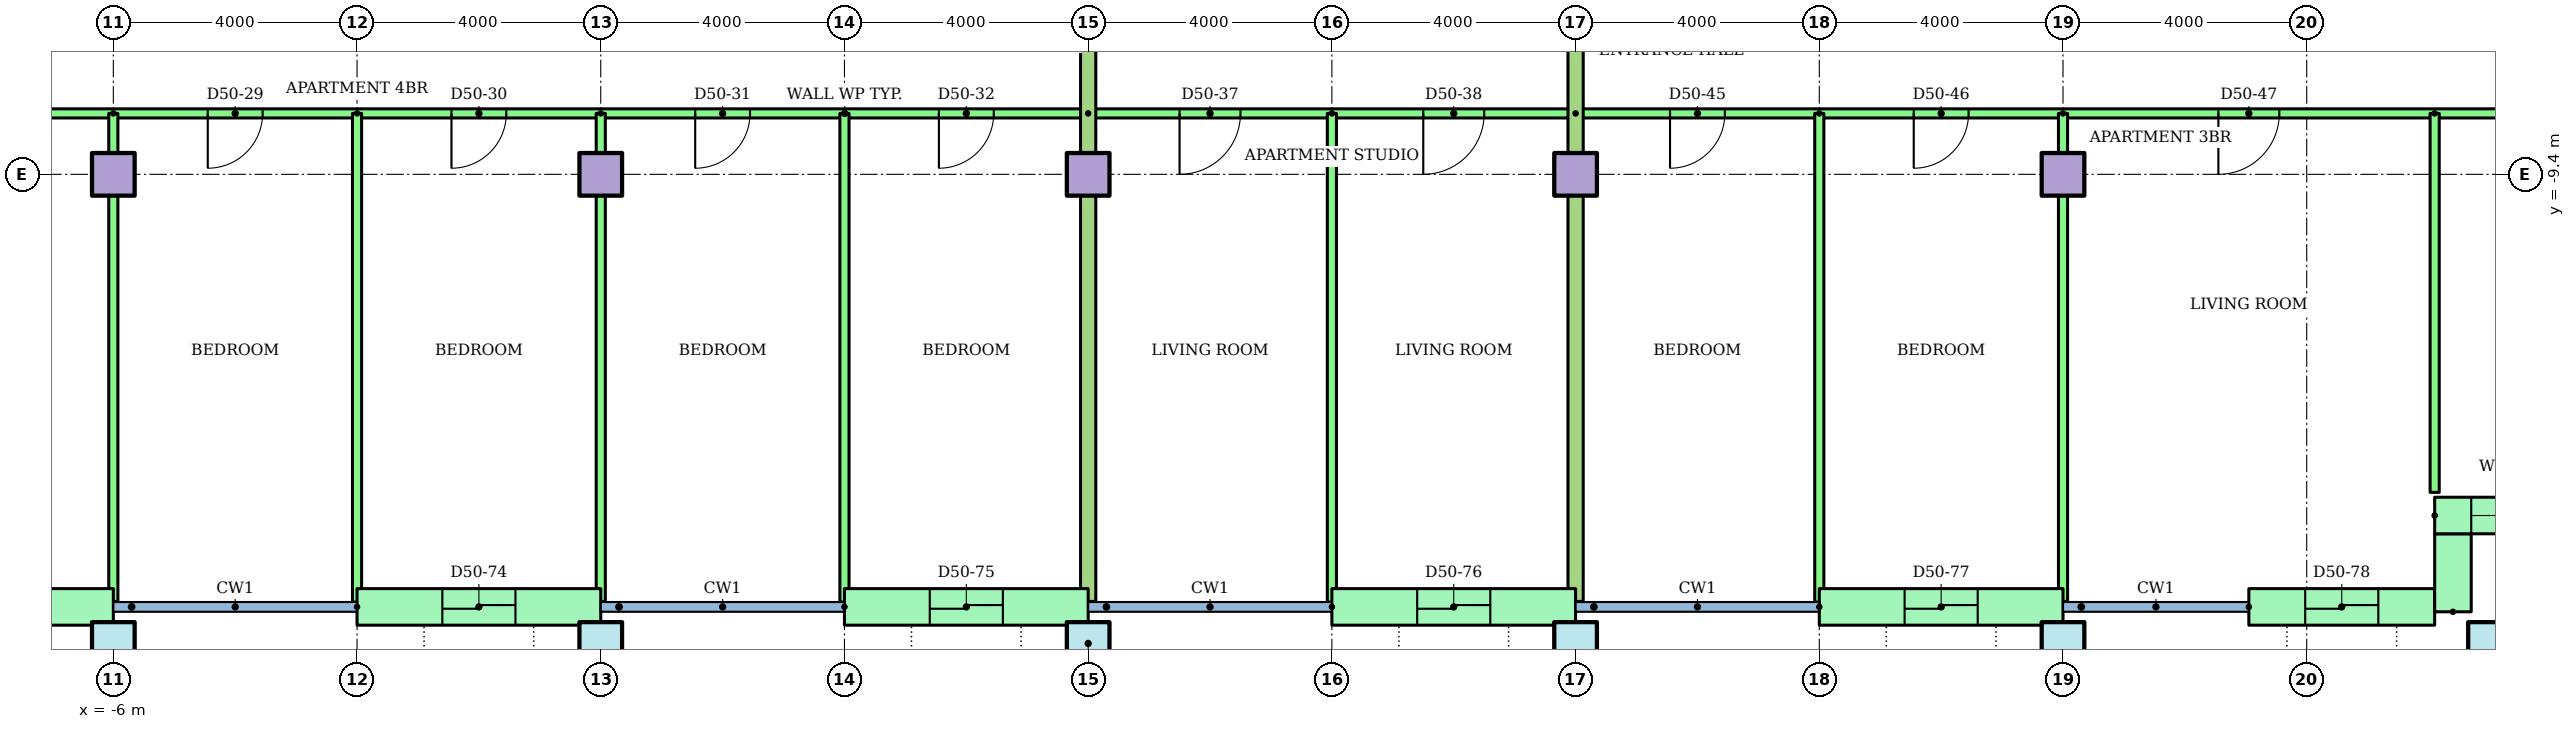
"""IFC4 building model, lengths in metres.
Left out: names, types, materials, properties, quantities, classifications, styles, units other than length and angle.
Written with IfcOpenShell. Run it as: python <this file> out.ifc"""

import sys

from ifc_helpers import new_model, si_unit, direction, frame, frame_2d, origin, origin_2d, place, context, subcontext, project, spatial, rectangle, hollow_rectangle, extrude, element, fill, save


model = new_model("IFC4")
c1 = context("Model", 3, precision=1e-05, world=origin(), true_north=direction((0.0, 1.0)))
c2 = subcontext(c1, "Body", "Model", "MODEL_VIEW")
j1 = project(units=[si_unit("LENGTHUNIT", "METRE"), si_unit("PLANEANGLEUNIT", "RADIAN")], contexts=[c1])
p1 = place(None, origin())
s1 = spatial("IfcSite", under=j1, at=p1, CompositionType="ELEMENT")
p2 = place(p1, origin())
s2 = spatial("IfcBuilding", under=s1, at=p2, CompositionType="ELEMENT")
p3 = place(p2, frame((0.0, 0.0, 190.9)))
s3 = spatial("IfcBuildingStorey", under=s2, at=p3, CompositionType="ELEMENT", Elevation=190.9)
for number, where in (
    (1, (-6.0, -17.1, 0.0)),
    (2, (2.0, -17.1, 0.0)),
    (3, (10.0, -17.1, 0.0)),
    (4, (18.0, -17.1, 0.0)),
    (5, (26.0, -17.1, 0.0)),
    (6, (33.0, -17.1, 0.0)),
):
    element("IfcColumn", number, at=place(p3, frame(where)), inside=s3, PredefinedType="COLUMN", context=c2, shape_type="SweptSolid", body=[
        extrude(hollow_rectangle(XDim=0.7, YDim=0.7, WallThickness=0.036, at=origin_2d()), origin(), (0.0, 0.0, 1.0), 3.2),
    ])
for number, where in (
    (7, (-6.0, -9.4, 0.0)),
    (8, (2.0, -9.4, 0.0)),
    (9, (10.0, -9.4, 0.0)),
    (10, (18.0, -9.4, 0.0)),
    (11, (26.0, -9.4, 0.0)),
):
    element("IfcColumn", number, at=place(p3, frame(where)), inside=s3, PredefinedType="COLUMN", context=c2, shape_type="SweptSolid", body=[
        extrude(rectangle(XDim=0.7, YDim=0.7, at=origin_2d()), origin(), (0.0, 0.0, 1.0), 3.2),
    ])
p4 = place(p3, frame((-10.0, -16.5, 0.0)))
e12 = element("IfcWall", 12, at=p4, inside=s3, PredefinedType="STANDARD", context=c2, shape_type="SweptSolid", body=[
    extrude(rectangle(XDim=4.0, YDim=0.6, at=frame_2d((2.0, 0.0))), origin(), (0.0, 0.0, 1.0), 2.8),
])
p5 = place(p4, frame((1.4, 0.0, 0.0)))
e13 = element("IfcOpeningElement", 13, at=p5, cuts=e12, PredefinedType="OPENING", context=c2, shape_type="SweptSolid", body=[
    extrude(rectangle(XDim=1.2, YDim=2.1, at=frame_2d((0.6, 1.05))), frame((0.0, 0.31, 0.0), z_axis=(0.0, -1.0, 0.0), x_axis=(1.0, 0.0, 0.0)), (0.0, 0.0, 1.0), 0.62),
])
p6 = place(p3, frame((-2.0, -16.5, 0.0)))
e14 = element("IfcWall", 14, at=p6, inside=s3, PredefinedType="STANDARD", context=c2, shape_type="SweptSolid", body=[
    extrude(rectangle(XDim=4.0, YDim=0.6, at=frame_2d((2.0, 0.0))), origin(), (0.0, 0.0, 1.0), 2.8),
])
p7 = place(p6, frame((1.4, 0.0, 0.0)))
e15 = element("IfcOpeningElement", 15, at=p7, cuts=e14, PredefinedType="OPENING", context=c2, shape_type="SweptSolid", body=[
    extrude(rectangle(XDim=1.2, YDim=2.1, at=frame_2d((0.6, 1.05))), frame((0.0, 0.31, 0.0), z_axis=(0.0, -1.0, 0.0), x_axis=(1.0, 0.0, 0.0)), (0.0, 0.0, 1.0), 0.62),
])
p8 = place(p3, frame((6.0, -16.5, 0.0)))
e16 = element("IfcWall", 16, at=p8, inside=s3, PredefinedType="STANDARD", context=c2, shape_type="SweptSolid", body=[
    extrude(rectangle(XDim=4.0, YDim=0.6, at=frame_2d((2.0, 0.0))), origin(), (0.0, 0.0, 1.0), 2.8),
])
p9 = place(p8, frame((1.4, 0.0, 0.0)))
e17 = element("IfcOpeningElement", 17, at=p9, cuts=e16, PredefinedType="OPENING", context=c2, shape_type="SweptSolid", body=[
    extrude(rectangle(XDim=1.2, YDim=2.1, at=frame_2d((0.6, 1.05))), frame((0.0, 0.31, 0.0), z_axis=(0.0, -1.0, 0.0), x_axis=(1.0, 0.0, 0.0)), (0.0, 0.0, 1.0), 0.62),
])
p10 = place(p3, frame((14.0, -16.5, 0.0)))
e18 = element("IfcWall", 18, at=p10, inside=s3, PredefinedType="STANDARD", context=c2, shape_type="SweptSolid", body=[
    extrude(rectangle(XDim=4.0, YDim=0.6, at=frame_2d((2.0, 0.0))), origin(), (0.0, 0.0, 1.0), 2.8),
])
p11 = place(p10, frame((1.4, 0.0, 0.0)))
e19 = element("IfcOpeningElement", 19, at=p11, cuts=e18, PredefinedType="OPENING", context=c2, shape_type="SweptSolid", body=[
    extrude(rectangle(XDim=1.2, YDim=2.1, at=frame_2d((0.6, 1.05))), frame((0.0, 0.31, 0.0), z_axis=(0.0, -1.0, 0.0), x_axis=(1.0, 0.0, 0.0)), (0.0, 0.0, 1.0), 0.62),
])
p12 = place(p3, frame((22.0, -16.5, 0.0)))
e20 = element("IfcWall", 20, at=p12, inside=s3, PredefinedType="STANDARD", context=c2, shape_type="SweptSolid", body=[
    extrude(rectangle(XDim=4.0, YDim=0.6, at=frame_2d((2.0, 0.0))), origin(), (0.0, 0.0, 1.0), 2.8),
])
p13 = place(p12, frame((1.4, 0.0, 0.0)))
e21 = element("IfcOpeningElement", 21, at=p13, cuts=e20, PredefinedType="OPENING", context=c2, shape_type="SweptSolid", body=[
    extrude(rectangle(XDim=1.2, YDim=2.1, at=frame_2d((0.6, 1.05))), frame((0.0, 0.31, 0.0), z_axis=(0.0, -1.0, 0.0), x_axis=(1.0, 0.0, 0.0)), (0.0, 0.0, 1.0), 0.62),
])
p14 = place(p3, frame((29.05, -16.5, 0.0)))
e22 = element("IfcWall", 22, at=p14, inside=s3, PredefinedType="STANDARD", context=c2, shape_type="SweptSolid", body=[
    extrude(rectangle(XDim=3.05, YDim=0.6, at=frame_2d((1.525, 0.0))), origin(), (0.0, 0.0, 1.0), 2.8),
])
p15 = place(p14, frame((0.925, 0.0, 0.0)))
e23 = element("IfcOpeningElement", 23, at=p15, cuts=e22, PredefinedType="OPENING", context=c2, shape_type="SweptSolid", body=[
    extrude(rectangle(XDim=1.2, YDim=2.1, at=frame_2d((0.6, 1.05))), frame((0.0, 0.31, 0.0), z_axis=(0.0, -1.0, 0.0), x_axis=(1.0, 0.0, 0.0)), (0.0, 0.0, 1.0), 0.62),
])
p16 = place(p3, frame((32.4, -16.58, 0.0), z_axis=(0.0, 0.0, 1.0), x_axis=(0.0, 1.0, 0.0)))
e24 = element("IfcWall", 24, at=p16, inside=s3, PredefinedType="STANDARD", context=c2, shape_type="SweptSolid", body=[
    extrude(rectangle(XDim=1.28, YDim=0.6, at=frame_2d((0.64, 0.0))), origin(), (0.0, 0.0, 1.0), 2.8),
])
p17 = place(p3, frame((32.1, -15.0, 0.0)))
e25 = element("IfcWall", 25, at=p17, inside=s3, PredefinedType="STANDARD", context=c2, shape_type="SweptSolid", body=[
    extrude(rectangle(XDim=2.1, YDim=0.6, at=frame_2d((1.05, 0.0))), origin(), (0.0, 0.0, 1.0), 2.8),
])
p18 = place(p17, frame((0.6, 0.0, 0.9)))
e26 = element("IfcOpeningElement", 26, at=p18, cuts=e25, PredefinedType="OPENING", context=c2, shape_type="SweptSolid", body=[
    extrude(rectangle(XDim=0.9, YDim=1.5, at=frame_2d((0.45, 0.75))), frame((0.0, 0.31, 0.0), z_axis=(0.0, -1.0, 0.0), x_axis=(1.0, 0.0, 0.0)), (0.0, 0.0, 1.0), 0.62),
])
p19 = place(p3, frame((10.0, -8.4, 0.0), z_axis=(0.0, 0.0, 1.0), x_axis=(-1.0, 0.0, 0.0)))
e27 = element("IfcWall", 27, at=p19, inside=s3, PredefinedType="PARTITIONING", context=c2, shape_type="SweptSolid", body=[
    extrude(rectangle(XDim=24.0, YDim=0.15, at=frame_2d((12.0, 0.0))), origin(), (0.0, 0.0, 1.0), 2.4),
])
p20 = place(p19, frame((19.5, 0.0, 0.0)))
e28 = element("IfcOpeningElement", 28, at=p20, cuts=e27, PredefinedType="OPENING", context=c2, shape_type="SweptSolid", body=[
    extrude(rectangle(XDim=1.0, YDim=2.1, at=frame_2d((0.5, 1.05))), frame((0.0, 0.085, 0.0), z_axis=(0.0, -1.0, 0.0), x_axis=(1.0, 0.0, 0.0)), (0.0, 0.0, 1.0), 0.17),
])
p21 = place(p19, frame((13.55, 0.0, 0.0)))
e29 = element("IfcOpeningElement", 29, at=p21, cuts=e27, PredefinedType="OPENING", context=c2, shape_type="SweptSolid", body=[
    extrude(rectangle(XDim=0.9, YDim=2.1, at=frame_2d((0.45, 1.05))), frame((0.0, 0.085, 0.0), z_axis=(0.0, -1.0, 0.0), x_axis=(1.0, 0.0, 0.0)), (0.0, 0.0, 1.0), 0.17),
])
p22 = place(p19, frame((9.55, 0.0, 0.0)))
e30 = element("IfcOpeningElement", 30, at=p22, cuts=e27, PredefinedType="OPENING", context=c2, shape_type="SweptSolid", body=[
    extrude(rectangle(XDim=0.9, YDim=2.1, at=frame_2d((0.45, 1.05))), frame((0.0, 0.085, 0.0), z_axis=(0.0, -1.0, 0.0), x_axis=(1.0, 0.0, 0.0)), (0.0, 0.0, 1.0), 0.17),
])
p23 = place(p19, frame((5.55, 0.0, 0.0)))
e31 = element("IfcOpeningElement", 31, at=p23, cuts=e27, PredefinedType="OPENING", context=c2, shape_type="SweptSolid", body=[
    extrude(rectangle(XDim=0.9, YDim=2.1, at=frame_2d((0.45, 1.05))), frame((0.0, 0.085, 0.0), z_axis=(0.0, -1.0, 0.0), x_axis=(1.0, 0.0, 0.0)), (0.0, 0.0, 1.0), 0.17),
])
p24 = place(p19, frame((1.55, 0.0, 0.0)))
e32 = element("IfcOpeningElement", 32, at=p24, cuts=e27, PredefinedType="OPENING", context=c2, shape_type="SweptSolid", body=[
    extrude(rectangle(XDim=0.9, YDim=2.1, at=frame_2d((0.45, 1.05))), frame((0.0, 0.085, 0.0), z_axis=(0.0, -1.0, 0.0), x_axis=(1.0, 0.0, 0.0)), (0.0, 0.0, 1.0), 0.17),
])
p25 = place(p3, frame((-6.0, -8.4, 0.0), z_axis=(0.0, 0.0, 1.0), x_axis=(0.0, -1.0, 0.0)))
e33 = element("IfcWall", 33, at=p25, inside=s3, PredefinedType="PARTITIONING", context=c2, shape_type="SweptSolid", body=[
    extrude(rectangle(XDim=8.01, YDim=0.15, at=frame_2d((4.005, 0.0))), origin(), (0.0, 0.0, 1.0), 2.4),
])
p26 = place(p3, frame((-2.0, -8.4, 0.0), z_axis=(0.0, 0.0, 1.0), x_axis=(0.0, -1.0, 0.0)))
e34 = element("IfcWall", 34, at=p26, inside=s3, PredefinedType="PARTITIONING", context=c2, shape_type="SweptSolid", body=[
    extrude(rectangle(XDim=8.021, YDim=0.15, at=frame_2d((4.01, 0.0))), origin(), (0.0, 0.0, 1.0), 2.4),
])
p27 = place(p3, frame((2.0, -8.4, 0.0), z_axis=(0.0, 0.0, 1.0), x_axis=(0.0, -1.0, 0.0)))
e35 = element("IfcWall", 35, at=p27, inside=s3, PredefinedType="PARTITIONING", context=c2, shape_type="SweptSolid", body=[
    extrude(rectangle(XDim=8.01, YDim=0.15, at=frame_2d((4.005, 0.0))), origin(), (0.0, 0.0, 1.0), 2.4),
])
p28 = place(p3, frame((6.0, -8.4, 0.0), z_axis=(0.0, 0.0, 1.0), x_axis=(0.0, -1.0, 0.0)))
e36 = element("IfcWall", 36, at=p28, inside=s3, PredefinedType="PARTITIONING", context=c2, shape_type="SweptSolid", body=[
    extrude(rectangle(XDim=8.021, YDim=0.15, at=frame_2d((4.01, 0.0))), origin(), (0.0, 0.0, 1.0), 2.4),
])
p29 = place(p3, frame((18.0, -8.4, 0.0), z_axis=(0.0, 0.0, 1.0), x_axis=(-1.0, 0.0, 0.0)))
e37 = element("IfcWall", 37, at=p29, inside=s3, PredefinedType="PARTITIONING", context=c2, shape_type="SweptSolid", body=[
    extrude(rectangle(XDim=8.0, YDim=0.15, at=frame_2d((4.0, 0.0))), origin(), (0.0, 0.0, 1.0), 2.4),
])
p30 = place(p29, frame((5.5, 0.0, 0.0)))
e38 = element("IfcOpeningElement", 38, at=p30, cuts=e37, PredefinedType="OPENING", context=c2, shape_type="SweptSolid", body=[
    extrude(rectangle(XDim=1.0, YDim=2.1, at=frame_2d((0.5, 1.05))), frame((0.0, 0.085, 0.0), z_axis=(0.0, -1.0, 0.0), x_axis=(1.0, 0.0, 0.0)), (0.0, 0.0, 1.0), 0.17),
])
p31 = place(p29, frame((1.5, 0.0, 0.0)))
e39 = element("IfcOpeningElement", 39, at=p31, cuts=e37, PredefinedType="OPENING", context=c2, shape_type="SweptSolid", body=[
    extrude(rectangle(XDim=1.0, YDim=2.1, at=frame_2d((0.5, 1.05))), frame((0.0, 0.085, 0.0), z_axis=(0.0, -1.0, 0.0), x_axis=(1.0, 0.0, 0.0)), (0.0, 0.0, 1.0), 0.17),
])
p32 = place(p3, frame((14.0, -8.4, 0.0), z_axis=(0.0, 0.0, 1.0), x_axis=(0.0, -1.0, 0.0)))
e40 = element("IfcWall", 40, at=p32, inside=s3, PredefinedType="PARTITIONING", context=c2, shape_type="SweptSolid", body=[
    extrude(rectangle(XDim=8.021, YDim=0.15, at=frame_2d((4.01, 0.0))), origin(), (0.0, 0.0, 1.0), 2.4),
])
p33 = place(p3, frame((10.0, -1.4, 0.0), z_axis=(0.0, 0.0, 1.0), x_axis=(0.0, -1.0, 0.0)))
e41 = element("IfcWall", 41, at=p33, inside=s3, PredefinedType="PARTITIONING", context=c2, shape_type="SweptSolid", body=[
    extrude(rectangle(XDim=15.01, YDim=0.25, at=frame_2d((7.505, 0.0))), origin(), (0.0, 0.0, 1.0), 2.4),
])
p34 = place(p3, frame((36.82, -8.4, 0.0), z_axis=(0.0, 0.0, 1.0), x_axis=(-1.0, 0.0, 0.0)))
e42 = element("IfcWall", 42, at=p34, inside=s3, PredefinedType="PARTITIONING", context=c2, shape_type="SweptSolid", body=[
    extrude(rectangle(XDim=18.82, YDim=0.15, at=frame_2d((9.41, 0.0))), origin(), (0.0, 0.0, 1.0), 2.4),
])
p35 = place(p34, frame((16.37, 0.0, 0.0)))
e43 = element("IfcOpeningElement", 43, at=p35, cuts=e42, PredefinedType="OPENING", context=c2, shape_type="SweptSolid", body=[
    extrude(rectangle(XDim=0.9, YDim=2.1, at=frame_2d((0.45, 1.05))), frame((0.0, 0.085, 0.0), z_axis=(0.0, -1.0, 0.0), x_axis=(1.0, 0.0, 0.0)), (0.0, 0.0, 1.0), 0.17),
])
p36 = place(p34, frame((12.37, 0.0, 0.0)))
e44 = element("IfcOpeningElement", 44, at=p36, cuts=e42, PredefinedType="OPENING", context=c2, shape_type="SweptSolid", body=[
    extrude(rectangle(XDim=0.9, YDim=2.1, at=frame_2d((0.45, 1.05))), frame((0.0, 0.085, 0.0), z_axis=(0.0, -1.0, 0.0), x_axis=(1.0, 0.0, 0.0)), (0.0, 0.0, 1.0), 0.17),
])
p37 = place(p34, frame((7.27, 0.0, 0.0)))
e45 = element("IfcOpeningElement", 45, at=p37, cuts=e42, PredefinedType="OPENING", context=c2, shape_type="SweptSolid", body=[
    extrude(rectangle(XDim=1.0, YDim=2.1, at=frame_2d((0.5, 1.05))), frame((0.0, 0.085, 0.0), z_axis=(0.0, -1.0, 0.0), x_axis=(1.0, 0.0, 0.0)), (0.0, 0.0, 1.0), 0.17),
])
p38 = place(p34, frame((1.373, 0.0, 0.0)))
e46 = element("IfcOpeningElement", 46, at=p38, cuts=e42, PredefinedType="OPENING", context=c2, shape_type="SweptSolid", body=[
    extrude(rectangle(XDim=0.9, YDim=2.1, at=frame_2d((0.45, 1.05))), frame((0.0, 0.085, 0.0), z_axis=(0.0, -1.0, 0.0), x_axis=(1.0, 0.0, 0.0)), (0.0, 0.0, 1.0), 0.17),
])
p39 = place(p3, frame((22.0, -8.4, 0.0), z_axis=(0.0, 0.0, 1.0), x_axis=(0.0, -1.0, 0.0)))
e47 = element("IfcWall", 47, at=p39, inside=s3, PredefinedType="PARTITIONING", context=c2, shape_type="SweptSolid", body=[
    extrude(rectangle(XDim=8.021, YDim=0.15, at=frame_2d((4.01, 0.0))), origin(), (0.0, 0.0, 1.0), 2.4),
])
p40 = place(p3, frame((26.0, -8.4, 0.0), z_axis=(0.0, 0.0, 1.0), x_axis=(0.0, -1.0, 0.0)))
e48 = element("IfcWall", 48, at=p40, inside=s3, PredefinedType="PARTITIONING", context=c2, shape_type="SweptSolid", body=[
    extrude(rectangle(XDim=8.01, YDim=0.15, at=frame_2d((4.005, 0.0))), origin(), (0.0, 0.0, 1.0), 2.4),
])
p41 = place(p3, frame((32.1, -8.4, 0.0), z_axis=(0.0, 0.0, 1.0), x_axis=(0.0, -1.0, 0.0)))
e49 = element("IfcWall", 49, at=p41, inside=s3, PredefinedType="PARTITIONING", context=c2, shape_type="SweptSolid", body=[
    extrude(rectangle(XDim=6.22, YDim=0.15, at=frame_2d((3.11, 0.0))), origin(), (0.0, 0.0, 1.0), 2.4),
])
p42 = place(p3, frame((18.0, -1.4, 0.0), z_axis=(0.0, 0.0, 1.0), x_axis=(0.0, -1.0, 0.0)))
e50 = element("IfcWall", 50, at=p42, inside=s3, PredefinedType="PARTITIONING", context=c2, shape_type="SweptSolid", body=[
    extrude(rectangle(XDim=15.01, YDim=0.25, at=frame_2d((7.505, 0.0))), origin(), (0.0, 0.0, 1.0), 2.4),
])
p43 = place(p18, origin())
e51 = element("IfcWindow", 51, at=p43, inside=s3, PartitioningType="SINGLE_PANEL", PredefinedType="WINDOW", context=c2, shape_type="SweptSolid", body=[
    extrude(rectangle(XDim=0.9, YDim=1.5, at=frame_2d((0.45, 0.75))), frame((0.0, 0.03, 0.0), z_axis=(0.0, -1.0, 0.0), x_axis=(1.0, 0.0, 0.0)), (0.0, 0.0, 1.0), 0.06),
])
fill(e26, e51)
p44 = place(p21, origin())
e52 = element("IfcDoor", 52, at=p44, inside=s3, OperationType="SINGLE_SWING_RIGHT", PredefinedType="DOOR", context=c2, shape_type="SweptSolid", body=[
    extrude(rectangle(XDim=0.9, YDim=2.1, at=frame_2d((0.45, 1.05))), frame((0.0, 0.025, 0.0), z_axis=(0.0, -1.0, 0.0), x_axis=(1.0, 0.0, 0.0)), (0.0, 0.0, 1.0), 0.05),
])
fill(e29, e52)
p45 = place(p22, origin())
e53 = element("IfcDoor", 53, at=p45, inside=s3, OperationType="SINGLE_SWING_RIGHT", PredefinedType="DOOR", context=c2, shape_type="SweptSolid", body=[
    extrude(rectangle(XDim=0.9, YDim=2.1, at=frame_2d((0.45, 1.05))), frame((0.0, 0.025, 0.0), z_axis=(0.0, -1.0, 0.0), x_axis=(1.0, 0.0, 0.0)), (0.0, 0.0, 1.0), 0.05),
])
fill(e30, e53)
p46 = place(p23, origin())
e54 = element("IfcDoor", 54, at=p46, inside=s3, OperationType="SINGLE_SWING_RIGHT", PredefinedType="DOOR", context=c2, shape_type="SweptSolid", body=[
    extrude(rectangle(XDim=0.9, YDim=2.1, at=frame_2d((0.45, 1.05))), frame((0.0, 0.025, 0.0), z_axis=(0.0, -1.0, 0.0), x_axis=(1.0, 0.0, 0.0)), (0.0, 0.0, 1.0), 0.05),
])
fill(e31, e54)
p47 = place(p24, origin())
e55 = element("IfcDoor", 55, at=p47, inside=s3, OperationType="SINGLE_SWING_RIGHT", PredefinedType="DOOR", context=c2, shape_type="SweptSolid", body=[
    extrude(rectangle(XDim=0.9, YDim=2.1, at=frame_2d((0.45, 1.05))), frame((0.0, 0.025, 0.0), z_axis=(0.0, -1.0, 0.0), x_axis=(1.0, 0.0, 0.0)), (0.0, 0.0, 1.0), 0.05),
])
fill(e32, e55)
p48 = place(p30, origin())
e56 = element("IfcDoor", 56, at=p48, inside=s3, OperationType="SINGLE_SWING_RIGHT", PredefinedType="DOOR", context=c2, shape_type="SweptSolid", body=[
    extrude(rectangle(XDim=1.0, YDim=2.1, at=frame_2d((0.5, 1.05))), frame((0.0, 0.025, 0.0), z_axis=(0.0, -1.0, 0.0), x_axis=(1.0, 0.0, 0.0)), (0.0, 0.0, 1.0), 0.05),
])
fill(e38, e56)
p49 = place(p31, origin())
e57 = element("IfcDoor", 57, at=p49, inside=s3, OperationType="SINGLE_SWING_RIGHT", PredefinedType="DOOR", context=c2, shape_type="SweptSolid", body=[
    extrude(rectangle(XDim=1.0, YDim=2.1, at=frame_2d((0.5, 1.05))), frame((0.0, 0.025, 0.0), z_axis=(0.0, -1.0, 0.0), x_axis=(1.0, 0.0, 0.0)), (0.0, 0.0, 1.0), 0.05),
])
fill(e39, e57)
p50 = place(p35, origin())
e58 = element("IfcDoor", 58, at=p50, inside=s3, OperationType="SINGLE_SWING_RIGHT", PredefinedType="DOOR", context=c2, shape_type="SweptSolid", body=[
    extrude(rectangle(XDim=0.9, YDim=2.1, at=frame_2d((0.45, 1.05))), frame((0.0, 0.025, 0.0), z_axis=(0.0, -1.0, 0.0), x_axis=(1.0, 0.0, 0.0)), (0.0, 0.0, 1.0), 0.05),
])
fill(e43, e58)
p51 = place(p36, origin())
e59 = element("IfcDoor", 59, at=p51, inside=s3, OperationType="SINGLE_SWING_RIGHT", PredefinedType="DOOR", context=c2, shape_type="SweptSolid", body=[
    extrude(rectangle(XDim=0.9, YDim=2.1, at=frame_2d((0.45, 1.05))), frame((0.0, 0.025, 0.0), z_axis=(0.0, -1.0, 0.0), x_axis=(1.0, 0.0, 0.0)), (0.0, 0.0, 1.0), 0.05),
])
fill(e44, e59)
p52 = place(p37, origin())
e60 = element("IfcDoor", 60, at=p52, inside=s3, OperationType="SINGLE_SWING_RIGHT", PredefinedType="DOOR", context=c2, shape_type="SweptSolid", body=[
    extrude(rectangle(XDim=1.0, YDim=2.1, at=frame_2d((0.5, 1.05))), frame((0.0, 0.025, 0.0), z_axis=(0.0, -1.0, 0.0), x_axis=(1.0, 0.0, 0.0)), (0.0, 0.0, 1.0), 0.05),
])
fill(e45, e60)
p53 = place(p7, origin())
e61 = element("IfcDoor", 61, at=p53, inside=s3, OperationType="SLIDING_TO_LEFT", PredefinedType="DOOR", context=c2, shape_type="SweptSolid", body=[
    extrude(rectangle(XDim=1.2, YDim=2.1, at=frame_2d((0.6, 1.05))), frame((0.0, 0.025, 0.0), z_axis=(0.0, -1.0, 0.0), x_axis=(1.0, 0.0, 0.0)), (0.0, 0.0, 1.0), 0.05),
])
fill(e15, e61)
p54 = place(p9, origin())
e62 = element("IfcDoor", 62, at=p54, inside=s3, OperationType="SLIDING_TO_LEFT", PredefinedType="DOOR", context=c2, shape_type="SweptSolid", body=[
    extrude(rectangle(XDim=1.2, YDim=2.1, at=frame_2d((0.6, 1.05))), frame((0.0, 0.025, 0.0), z_axis=(0.0, -1.0, 0.0), x_axis=(1.0, 0.0, 0.0)), (0.0, 0.0, 1.0), 0.05),
])
fill(e17, e62)
p55 = place(p11, origin())
e63 = element("IfcDoor", 63, at=p55, inside=s3, OperationType="SLIDING_TO_LEFT", PredefinedType="DOOR", context=c2, shape_type="SweptSolid", body=[
    extrude(rectangle(XDim=1.2, YDim=2.1, at=frame_2d((0.6, 1.05))), frame((0.0, 0.025, 0.0), z_axis=(0.0, -1.0, 0.0), x_axis=(1.0, 0.0, 0.0)), (0.0, 0.0, 1.0), 0.05),
])
fill(e19, e63)
p56 = place(p13, origin())
e64 = element("IfcDoor", 64, at=p56, inside=s3, OperationType="SLIDING_TO_LEFT", PredefinedType="DOOR", context=c2, shape_type="SweptSolid", body=[
    extrude(rectangle(XDim=1.2, YDim=2.1, at=frame_2d((0.6, 1.05))), frame((0.0, 0.025, 0.0), z_axis=(0.0, -1.0, 0.0), x_axis=(1.0, 0.0, 0.0)), (0.0, 0.0, 1.0), 0.05),
])
fill(e21, e64)
p57 = place(p15, origin())
e65 = element("IfcDoor", 65, at=p57, inside=s3, OperationType="SLIDING_TO_LEFT", PredefinedType="DOOR", context=c2, shape_type="SweptSolid", body=[
    extrude(rectangle(XDim=1.2, YDim=2.1, at=frame_2d((0.6, 1.05))), frame((0.0, 0.025, 0.0), z_axis=(0.0, -1.0, 0.0), x_axis=(1.0, 0.0, 0.0)), (0.0, 0.0, 1.0), 0.05),
])
fill(e23, e65)
save(model, sys.argv[1])
